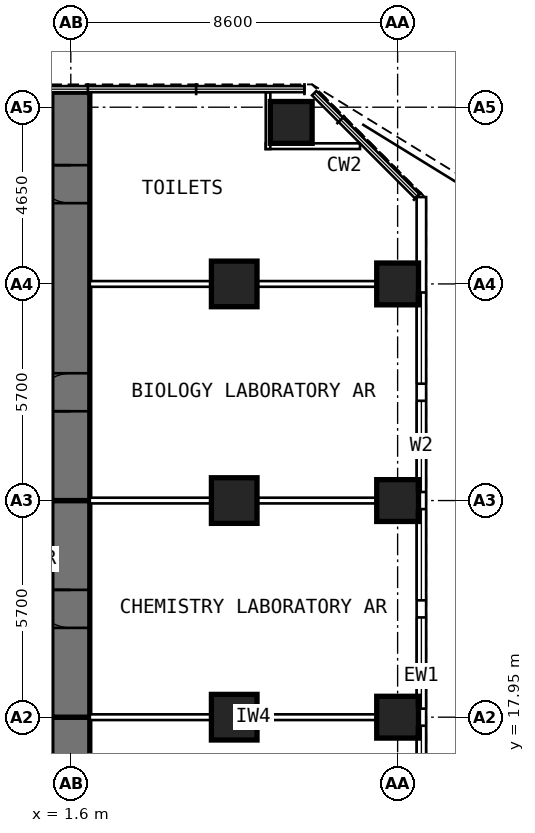
"""IFC4 building model, lengths in metres.
Left out: names, types, materials, properties, quantities, classifications, styles, units other than length and angle.
Written with IfcOpenShell. Run it as: python <this file> out.ifc"""

import sys

from ifc_helpers import new_model, si_unit, direction, frame, frame_2d, origin, origin_2d, place, context, subcontext, project, spatial, rectangle, extrude, element, fill, save


model = new_model("IFC4")
c1 = context("Model", 3, precision=1e-05, world=origin(), true_north=direction((0.0, 1.0)))
c2 = subcontext(c1, "Body", "Model", "MODEL_VIEW")
j1 = project(units=[si_unit("LENGTHUNIT", "METRE"), si_unit("PLANEANGLEUNIT", "RADIAN")], contexts=[c1])
p1 = place(None, origin())
s1 = spatial("IfcSite", under=j1, at=p1, CompositionType="ELEMENT")
p2 = place(p1, origin())
s2 = spatial("IfcBuilding", under=s1, at=p2, CompositionType="ELEMENT")
p3 = place(p2, frame((0.0, 0.0, 20.4)))
s3 = spatial("IfcBuildingStorey", under=s2, at=p3, CompositionType="ELEMENT", Elevation=20.4)
for number, where, z_axis, x_axis in (
    (1, (10.2, 17.95, 0.0), (0.0, 0.0, 1.0), (0.0, 1.0, 0.0)),
    (2, (10.2, 23.65, 0.0), (0.0, 0.0, 1.0), (0.0, 1.0, 0.0)),
    (3, (10.2, 29.35, 0.0), (0.0, 0.0, 1.0), (0.0, 1.0, 0.0)),
    (4, (7.4, 33.6, 0.0), (0.0, 0.0, 1.0), (0.0, 1.0, 0.0)),
):
    element("IfcColumn", number, at=place(p3, frame(where, z_axis=z_axis, x_axis=x_axis)), inside=s3, PredefinedType="COLUMN", context=c2, shape_type="SweptSolid", body=[
        extrude(rectangle(XDim=1.1, YDim=1.1, at=origin_2d()), origin(), (0.0, 0.0, 1.0), 4.8),
    ])
for number, where, z_axis, x_axis in (
    (5, (5.9, 17.95, 0.0), (0.0, 0.0, 1.0), (0.0, 1.0, 0.0)),
    (6, (5.9, 23.65, 0.0), (0.0, 0.0, 1.0), (0.0, 1.0, 0.0)),
    (7, (5.9, 29.35, 0.0), (0.0, 0.0, 1.0), (0.0, 1.0, 0.0)),
):
    element("IfcColumn", number, at=place(p3, frame(where, z_axis=z_axis, x_axis=x_axis)), inside=s3, PredefinedType="COLUMN", context=c2, shape_type="SweptSolid", body=[
        extrude(rectangle(XDim=1.2, YDim=1.2, at=origin_2d()), origin(), (0.0, 0.0, 1.0), 4.8),
    ])
p4 = place(p3, frame((1.6, 9.6, 0.0), z_axis=(0.0, 0.0, 1.0), x_axis=(0.0, 1.0, 0.0)))
e8 = element("IfcWall", 8, at=p4, inside=s3, PredefinedType="SHEAR", context=c2, shape_type="SweptSolid", body=[
    extrude(rectangle(XDim=8.35, YDim=1.0, at=frame_2d((4.175, 0.0))), origin(), (0.0, 0.0, 1.0), 4.8),
])
p5 = place(p4, frame((3.875, 0.0, 0.0)))
e9 = element("IfcOpeningElement", 9, at=p5, cuts=e8, PredefinedType="OPENING", context=c2, shape_type="SweptSolid", body=[
    extrude(rectangle(XDim=1.0, YDim=2.3, at=frame_2d((0.5, 1.15))), frame((0.0, 0.512, 0.0), z_axis=(0.0, -1.0, 0.0), x_axis=(1.0, 0.0, 0.0)), (0.0, 0.0, 1.0), 1.024),
])
p6 = place(p3, frame((1.6, 17.95, 0.0), z_axis=(0.0, 0.0, 1.0), x_axis=(0.0, 1.0, 0.0)))
e10 = element("IfcWall", 10, at=p6, inside=s3, PredefinedType="SHEAR", context=c2, shape_type="SweptSolid", body=[
    extrude(rectangle(XDim=5.7, YDim=1.0, at=frame_2d((2.85, 0.0))), origin(), (0.0, 0.0, 1.0), 4.8),
])
p7 = place(p6, frame((2.35, 0.0, 0.0)))
e11 = element("IfcOpeningElement", 11, at=p7, cuts=e10, PredefinedType="OPENING", context=c2, shape_type="SweptSolid", body=[
    extrude(rectangle(XDim=1.0, YDim=2.3, at=frame_2d((0.5, 1.15))), frame((0.0, 0.512, 0.0), z_axis=(0.0, -1.0, 0.0), x_axis=(1.0, 0.0, 0.0)), (0.0, 0.0, 1.0), 1.024),
])
p8 = place(p3, frame((1.6, 23.65, 0.0), z_axis=(0.0, 0.0, 1.0), x_axis=(0.0, 1.0, 0.0)))
e12 = element("IfcWall", 12, at=p8, inside=s3, PredefinedType="SHEAR", context=c2, shape_type="SweptSolid", body=[
    extrude(rectangle(XDim=10.745, YDim=1.0, at=frame_2d((5.373, 0.0))), origin(), (0.0, 0.0, 1.0), 4.8),
])
p9 = place(p8, frame((2.35, 0.0, 0.0)))
e13 = element("IfcOpeningElement", 13, at=p9, cuts=e12, PredefinedType="OPENING", context=c2, shape_type="SweptSolid", body=[
    extrude(rectangle(XDim=1.0, YDim=2.3, at=frame_2d((0.5, 1.15))), frame((0.0, 0.512, 0.0), z_axis=(0.0, -1.0, 0.0), x_axis=(1.0, 0.0, 0.0)), (0.0, 0.0, 1.0), 1.024),
])
p10 = place(p8, frame((7.825, 0.0, 0.0)))
e14 = element("IfcOpeningElement", 14, at=p10, cuts=e12, PredefinedType="OPENING", context=c2, shape_type="SweptSolid", body=[
    extrude(rectangle(XDim=1.0, YDim=2.3, at=frame_2d((0.5, 1.15))), frame((0.0, 0.512, 0.0), z_axis=(0.0, -1.0, 0.0), x_axis=(1.0, 0.0, 0.0)), (0.0, 0.0, 1.0), 1.024),
])
p11 = place(p3, frame((10.825, 6.409, 0.0), z_axis=(0.0, 0.0, 1.0), x_axis=(0.0, 1.0, 0.0)))
e15 = element("IfcWall", 15, at=p11, inside=s3, PredefinedType="SOLIDWALL", context=c2, shape_type="SweptSolid", body=[
    extrude(rectangle(XDim=25.226, YDim=0.25, at=frame_2d((12.613, 0.0))), origin(), (0.0, 0.0, 1.0), 4.55),
])
p12 = place(p11, frame((0.366, 0.0, 0.9)))
e16 = element("IfcOpeningElement", 16, at=p12, cuts=e15, PredefinedType="OPENING", context=c2, shape_type="SweptSolid", body=[
    extrude(rectangle(XDim=2.4, YDim=2.6, at=frame_2d((1.2, 1.3))), frame((0.0, 0.137, 0.0), z_axis=(0.0, -1.0, 0.0), x_axis=(1.0, 0.0, 0.0)), (0.0, 0.0, 1.0), 0.274),
])
p13 = place(p11, frame((3.216, 0.0, 0.9)))
e17 = element("IfcOpeningElement", 17, at=p13, cuts=e15, PredefinedType="OPENING", context=c2, shape_type="SweptSolid", body=[
    extrude(rectangle(XDim=2.4, YDim=2.6, at=frame_2d((1.2, 1.3))), frame((0.0, 0.137, 0.0), z_axis=(0.0, -1.0, 0.0), x_axis=(1.0, 0.0, 0.0)), (0.0, 0.0, 1.0), 0.274),
])
p14 = place(p11, frame((6.366, 0.0, 0.0)))
e18 = element("IfcOpeningElement", 18, at=p14, cuts=e15, PredefinedType="OPENING", context=c2, shape_type="SweptSolid", body=[
    extrude(rectangle(XDim=1.8, YDim=2.4, at=frame_2d((0.9, 1.2))), frame((0.0, 0.137, 0.0), z_axis=(0.0, -1.0, 0.0), x_axis=(1.0, 0.0, 0.0)), (0.0, 0.0, 1.0), 0.274),
])
p15 = place(p11, frame((8.916, 0.0, 0.9)))
e19 = element("IfcOpeningElement", 19, at=p15, cuts=e15, PredefinedType="OPENING", context=c2, shape_type="SweptSolid", body=[
    extrude(rectangle(XDim=2.4, YDim=2.6, at=frame_2d((1.2, 1.3))), frame((0.0, 0.137, 0.0), z_axis=(0.0, -1.0, 0.0), x_axis=(1.0, 0.0, 0.0)), (0.0, 0.0, 1.0), 0.274),
])
p16 = place(p11, frame((11.766, 0.0, 0.9)))
e20 = element("IfcOpeningElement", 20, at=p16, cuts=e15, PredefinedType="OPENING", context=c2, shape_type="SweptSolid", body=[
    extrude(rectangle(XDim=2.4, YDim=2.6, at=frame_2d((1.2, 1.3))), frame((0.0, 0.137, 0.0), z_axis=(0.0, -1.0, 0.0), x_axis=(1.0, 0.0, 0.0)), (0.0, 0.0, 1.0), 0.274),
])
p17 = place(p11, frame((14.616, 0.0, 0.9)))
e21 = element("IfcOpeningElement", 21, at=p17, cuts=e15, PredefinedType="OPENING", context=c2, shape_type="SweptSolid", body=[
    extrude(rectangle(XDim=2.4, YDim=2.6, at=frame_2d((1.2, 1.3))), frame((0.0, 0.137, 0.0), z_axis=(0.0, -1.0, 0.0), x_axis=(1.0, 0.0, 0.0)), (0.0, 0.0, 1.0), 0.274),
])
p18 = place(p11, frame((17.466, 0.0, 0.9)))
e22 = element("IfcOpeningElement", 22, at=p18, cuts=e15, PredefinedType="OPENING", context=c2, shape_type="SweptSolid", body=[
    extrude(rectangle(XDim=2.4, YDim=2.6, at=frame_2d((1.2, 1.3))), frame((0.0, 0.137, 0.0), z_axis=(0.0, -1.0, 0.0), x_axis=(1.0, 0.0, 0.0)), (0.0, 0.0, 1.0), 0.274),
])
p19 = place(p11, frame((20.316, 0.0, 0.9)))
e23 = element("IfcOpeningElement", 23, at=p19, cuts=e15, PredefinedType="OPENING", context=c2, shape_type="SweptSolid", body=[
    extrude(rectangle(XDim=2.4, YDim=2.6, at=frame_2d((1.2, 1.3))), frame((0.0, 0.137, 0.0), z_axis=(0.0, -1.0, 0.0), x_axis=(1.0, 0.0, 0.0)), (0.0, 0.0, 1.0), 0.274),
])
p20 = place(p3, frame((6.73, 32.975, 0.0), z_axis=(0.0, 0.0, 1.0), x_axis=(1.0, 0.0, 0.0)))
e24 = element("IfcWall", 24, at=p20, inside=s3, PredefinedType="PARTITIONING", context=c2, shape_type="SweptSolid", body=[
    extrude(rectangle(XDim=2.48, YDim=0.15, at=frame_2d((1.24, 0.0))), origin(), (0.0, 0.0, 1.0), 4.55),
])
p21 = place(p3, frame((6.79, 32.9, 0.0), z_axis=(0.0, 0.0, 1.0), x_axis=(0.0, 1.0, 0.0)))
e25 = element("IfcWall", 25, at=p21, inside=s3, PredefinedType="PARTITIONING", context=c2, shape_type="SweptSolid", body=[
    extrude(rectangle(XDim=1.495, YDim=0.12, at=frame_2d((0.748, 0.0))), origin(), (0.0, 0.0, 1.0), 4.55),
])
for number, where, z_axis, x_axis in (
    (26, (2.1, 17.95, 0.0), (0.0, 0.0, 1.0), (1.0, 0.0, 0.0)),
    (27, (2.1, 23.65, 0.0), (0.0, 0.0, 1.0), (1.0, 0.0, 0.0)),
    (28, (2.1, 29.35, 0.0), (0.0, 0.0, 1.0), (1.0, 0.0, 0.0)),
):
    element("IfcWall", number, at=place(p3, frame(where, z_axis=z_axis, x_axis=x_axis)), inside=s3, PredefinedType="PARTITIONING", context=c2, shape_type="SweptSolid", body=[
        extrude(rectangle(XDim=8.6, YDim=0.15, at=frame_2d((4.3, 0.0))), origin(), (0.0, 0.0, 1.0), 3.55),
    ])
p22 = place(p15, origin())
e29 = element("IfcWindow", 29, at=p22, inside=s3, PartitioningType="SINGLE_PANEL", PredefinedType="WINDOW", context=c2, shape_type="SweptSolid", body=[
    extrude(rectangle(XDim=2.4, YDim=2.6, at=frame_2d((1.2, 1.3))), frame((0.0, 0.03, 0.0), z_axis=(0.0, -1.0, 0.0), x_axis=(1.0, 0.0, 0.0)), (0.0, 0.0, 1.0), 0.06),
])
fill(e19, e29)
p23 = place(p16, origin())
e30 = element("IfcWindow", 30, at=p23, inside=s3, PartitioningType="SINGLE_PANEL", PredefinedType="WINDOW", context=c2, shape_type="SweptSolid", body=[
    extrude(rectangle(XDim=2.4, YDim=2.6, at=frame_2d((1.2, 1.3))), frame((0.0, 0.03, 0.0), z_axis=(0.0, -1.0, 0.0), x_axis=(1.0, 0.0, 0.0)), (0.0, 0.0, 1.0), 0.06),
])
fill(e20, e30)
p24 = place(p17, origin())
e31 = element("IfcWindow", 31, at=p24, inside=s3, PartitioningType="SINGLE_PANEL", PredefinedType="WINDOW", context=c2, shape_type="SweptSolid", body=[
    extrude(rectangle(XDim=2.4, YDim=2.6, at=frame_2d((1.2, 1.3))), frame((0.0, 0.03, 0.0), z_axis=(0.0, -1.0, 0.0), x_axis=(1.0, 0.0, 0.0)), (0.0, 0.0, 1.0), 0.06),
])
fill(e21, e31)
p25 = place(p18, origin())
e32 = element("IfcWindow", 32, at=p25, inside=s3, PartitioningType="SINGLE_PANEL", PredefinedType="WINDOW", context=c2, shape_type="SweptSolid", body=[
    extrude(rectangle(XDim=2.4, YDim=2.6, at=frame_2d((1.2, 1.3))), frame((0.0, 0.03, 0.0), z_axis=(0.0, -1.0, 0.0), x_axis=(1.0, 0.0, 0.0)), (0.0, 0.0, 1.0), 0.06),
])
fill(e22, e32)
p26 = place(p19, origin())
e33 = element("IfcWindow", 33, at=p26, inside=s3, PartitioningType="SINGLE_PANEL", PredefinedType="WINDOW", context=c2, shape_type="SweptSolid", body=[
    extrude(rectangle(XDim=2.4, YDim=2.6, at=frame_2d((1.2, 1.3))), frame((0.0, 0.03, 0.0), z_axis=(0.0, -1.0, 0.0), x_axis=(1.0, 0.0, 0.0)), (0.0, 0.0, 1.0), 0.06),
])
fill(e23, e33)
p27 = place(p7, origin())
e34 = element("IfcDoor", 34, at=p27, inside=s3, OperationType="SINGLE_SWING_RIGHT", PredefinedType="DOOR", context=c2, shape_type="SweptSolid", body=[
    extrude(rectangle(XDim=1.0, YDim=2.3, at=frame_2d((0.5, 1.15))), frame((0.0, 0.25, 0.0), z_axis=(0.0, -1.0, 0.0), x_axis=(1.0, 0.0, 0.0)), (0.0, 0.0, 1.0), 0.5),
])
fill(e11, e34)
p28 = place(p9, origin())
e35 = element("IfcDoor", 35, at=p28, inside=s3, OperationType="SINGLE_SWING_LEFT", PredefinedType="DOOR", context=c2, shape_type="SweptSolid", body=[
    extrude(rectangle(XDim=1.0, YDim=2.3, at=frame_2d((0.5, 1.15))), frame((0.0, 0.25, 0.0), z_axis=(0.0, -1.0, 0.0), x_axis=(1.0, 0.0, 0.0)), (0.0, 0.0, 1.0), 0.5),
])
fill(e13, e35)
p29 = place(p10, origin())
e36 = element("IfcDoor", 36, at=p29, inside=s3, OperationType="SINGLE_SWING_RIGHT", PredefinedType="DOOR", context=c2, shape_type="SweptSolid", body=[
    extrude(rectangle(XDim=1.0, YDim=2.3, at=frame_2d((0.5, 1.15))), frame((0.0, 0.25, 0.0), z_axis=(0.0, -1.0, 0.0), x_axis=(1.0, 0.0, 0.0)), (0.0, 0.0, 1.0), 0.5),
])
fill(e14, e36)
save(model, sys.argv[1])
